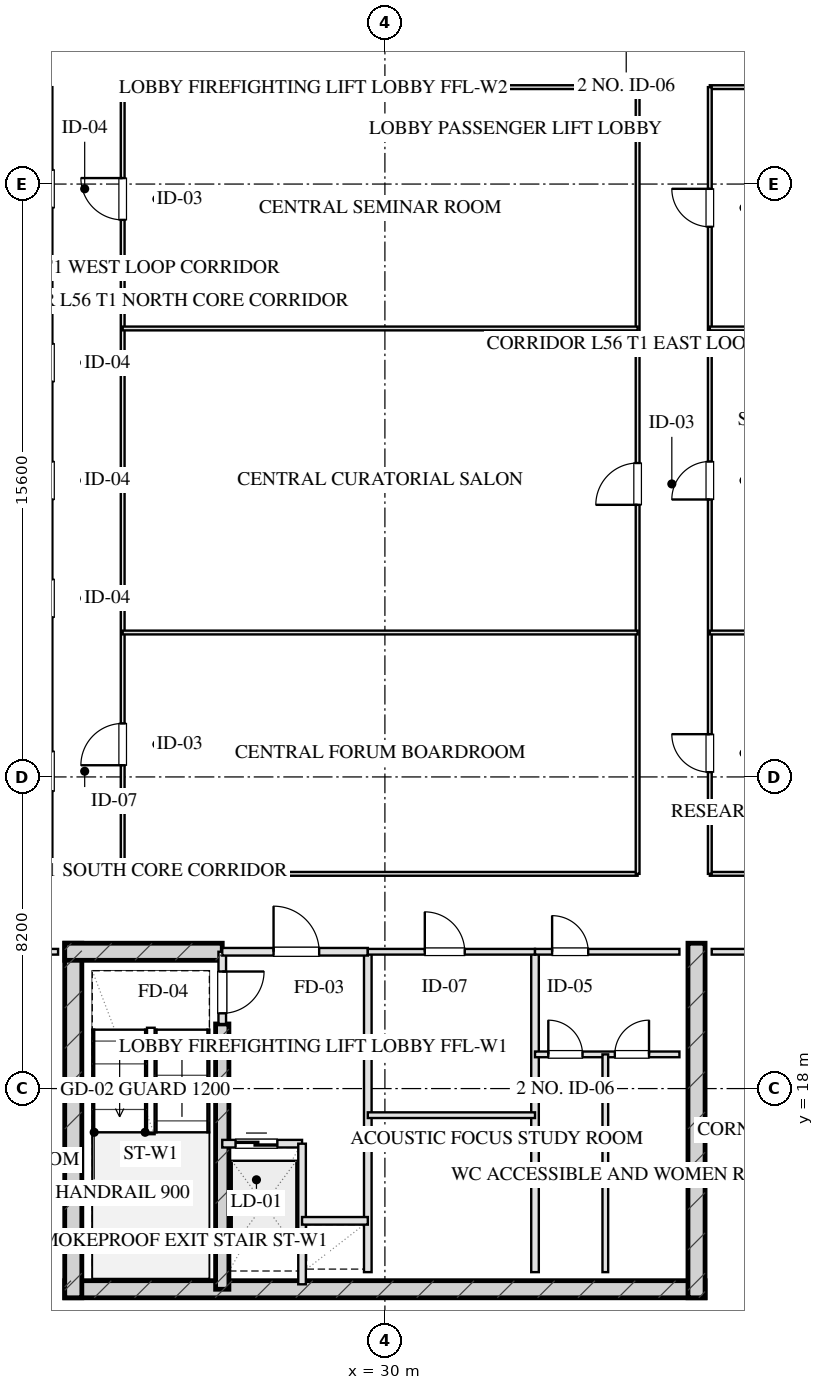
"""IFC4 building model, lengths in metres.
Left out: names, types, materials, properties, quantities, classifications, styles, units other than length and angle.
Written with IfcOpenShell. Run it as: python <this file> out.ifc"""

import sys

from ifc_helpers import new_model, si_unit, direction, frame, frame_2d, origin, place, context, subcontext, project, spatial, rectangle, extrude, element, fill, save


model = new_model("IFC4")
c1 = context("Model", 3, precision=1e-05, world=origin(), true_north=direction((0.0, 1.0)))
c2 = subcontext(c1, "Body", "Model", "MODEL_VIEW")
j1 = project(units=[si_unit("LENGTHUNIT", "METRE"), si_unit("PLANEANGLEUNIT", "RADIAN")], contexts=[c1])
p1 = place(None, origin())
s1 = spatial("IfcSite", under=j1, at=p1, CompositionType="ELEMENT")
p2 = place(p1, origin())
s2 = spatial("IfcBuilding", under=s1, at=p2, CompositionType="ELEMENT")
p3 = place(p2, frame((0.0, 0.0, 209.3)))
s3 = spatial("IfcBuildingStorey", under=s2, at=p3, CompositionType="ELEMENT", Elevation=209.3)
p4 = place(p3, frame((21.575, 12.72, 0.0), z_axis=(0.0, 0.0, 1.0), x_axis=(1.0, 0.0, 0.0)))
e1 = element("IfcWall", 1, at=p4, inside=s3, PredefinedType="SHEAR", context=c2, shape_type="SweptSolid", body=[
    extrude(rectangle(XDim=16.85, YDim=0.45, at=frame_2d((8.425, 0.0))), origin(), (0.0, 0.0, 1.0), 3.45),
])
for number, where, z_axis, x_axis in (
    (2, (21.8, 21.825, 0.0), (0.0, 0.0, 1.0), (0.0, -1.0, 0.0)),
    (3, (38.2, 21.825, 0.0), (0.0, 0.0, 1.0), (0.0, -1.0, 0.0)),
):
    element("IfcWall", number, at=place(p3, frame(where, z_axis=z_axis, x_axis=x_axis)), inside=s3, PredefinedType="SHEAR", context=c2, shape_type="SweptSolid", body=[
        extrude(rectangle(XDim=9.33, YDim=0.45, at=frame_2d((4.665, 0.0))), origin(), (0.0, 0.0, 1.0), 3.45),
    ])
p5 = place(p3, frame((25.72, 19.7, 0.0), z_axis=(0.0, 0.0, 1.0), x_axis=(0.0, -1.0, 0.0)))
e4 = element("IfcWall", 4, at=p5, inside=s3, PredefinedType="SHEAR", context=c2, shape_type="SweptSolid", body=[
    extrude(rectangle(XDim=6.98, YDim=0.35, at=frame_2d((3.49, 0.0))), origin(), (0.0, 0.0, 1.0), 3.45),
])
p6 = place(p3, frame((21.575, 21.6, 0.0), z_axis=(0.0, 0.0, 1.0), x_axis=(1.0, 0.0, 0.0)))
e5 = element("IfcWall", 5, at=p6, inside=s3, PredefinedType="SHEAR", context=c2, shape_type="SweptSolid", body=[
    extrude(rectangle(XDim=4.145, YDim=0.45, at=frame_2d((2.073, 0.0))), origin(), (0.0, 0.0, 1.0), 3.45),
])
p7 = place(p3, frame((25.72, 21.6, 0.0), z_axis=(0.0, 0.0, 1.0), x_axis=(0.0, -1.0, 0.0)))
e6 = element("IfcWall", 6, at=p7, inside=s3, PredefinedType="PARTITIONING", context=c2, shape_type="SweptSolid", body=[
    extrude(rectangle(XDim=1.9, YDim=0.2, at=frame_2d((0.95, 0.0))), origin(), (0.0, 0.0, 1.0), 3.175),
])
p8 = place(p7, frame((0.52, 0.0, 0.0)))
e7 = element("IfcOpeningElement", 7, at=p8, cuts=e6, PredefinedType="OPENING", context=c2, shape_type="SweptSolid", body=[
    extrude(rectangle(XDim=1.1, YDim=2.05, at=frame_2d((0.55, 1.025))), frame((0.0, 0.11, 0.0), z_axis=(0.0, -1.0, 0.0), x_axis=(1.0, 0.0, 0.0)), (0.0, 0.0, 1.0), 0.22),
])
p9 = place(p3, frame((29.55, 21.6, 0.0), z_axis=(0.0, 0.0, 1.0), x_axis=(0.0, -1.0, 0.0)))
e8 = element("IfcWall", 8, at=p9, inside=s3, PredefinedType="PARTITIONING", context=c2, shape_type="SweptSolid", body=[
    extrude(rectangle(XDim=8.43, YDim=0.2, at=frame_2d((4.215, 0.0))), origin(), (0.0, 0.0, 1.0), 3.175),
])
p10 = place(p3, frame((25.72, 21.6, 0.0), z_axis=(0.0, 0.0, 1.0), x_axis=(1.0, 0.0, 0.0)))
e9 = element("IfcWall", 9, at=p10, inside=s3, PredefinedType="PARTITIONING", context=c2, shape_type="SweptSolid", body=[
    extrude(rectangle(XDim=3.83, YDim=0.2, at=frame_2d((1.915, 0.0))), origin(), (0.0, 0.0, 1.0), 3.175),
])
p11 = place(p10, frame((1.35, 0.0, 0.0)))
e10 = element("IfcOpeningElement", 10, at=p11, cuts=e9, PredefinedType="OPENING", context=c2, shape_type="SweptSolid", body=[
    extrude(rectangle(XDim=1.2, YDim=2.05, at=frame_2d((0.6, 1.025))), frame((0.0, 0.11, 0.0), z_axis=(0.0, -1.0, 0.0), x_axis=(1.0, 0.0, 0.0)), (0.0, 0.0, 1.0), 0.22),
])
p12 = place(p3, frame((25.72, 16.55, 0.0), z_axis=(0.0, 0.0, 1.0), x_axis=(1.0, 0.0, 0.0)))
e11 = element("IfcWall", 11, at=p12, inside=s3, PredefinedType="PARTITIONING", context=c2, shape_type="SweptSolid", body=[
    extrude(rectangle(XDim=2.1, YDim=0.2, at=frame_2d((1.05, 0.0))), origin(), (0.0, 0.0, 1.0), 3.175),
])
p13 = place(p12, frame((0.35, 0.0, 0.0)))
e12 = element("IfcOpeningElement", 12, at=p13, cuts=e11, PredefinedType="OPENING", context=c2, shape_type="SweptSolid", body=[
    extrude(rectangle(XDim=1.1, YDim=2.05, at=frame_2d((0.55, 1.025))), frame((0.0, 0.11, 0.0), z_axis=(0.0, -1.0, 0.0), x_axis=(1.0, 0.0, 0.0)), (0.0, 0.0, 1.0), 0.22),
])
p14 = place(p3, frame((27.82, 16.55, 0.0), z_axis=(0.0, 0.0, 1.0), x_axis=(0.0, -1.0, 0.0)))
e13 = element("IfcWall", 13, at=p14, inside=s3, PredefinedType="PARTITIONING", context=c2, shape_type="SweptSolid", body=[
    extrude(rectangle(XDim=3.7, YDim=0.2, at=frame_2d((1.85, 0.0))), origin(), (0.0, 0.0, 1.0), 3.175),
])
p15 = place(p3, frame((27.82, 14.52, 0.0), z_axis=(0.0, 0.0, 1.0), x_axis=(1.0, 0.0, 0.0)))
e14 = element("IfcWall", 14, at=p15, inside=s3, PredefinedType="PARTITIONING", context=c2, shape_type="SweptSolid", body=[
    extrude(rectangle(XDim=1.73, YDim=0.2, at=frame_2d((0.865, 0.0))), origin(), (0.0, 0.0, 1.0), 3.175),
])
p16 = place(p3, frame((33.95, 21.6, 0.0), z_axis=(0.0, 0.0, 1.0), x_axis=(0.0, -1.0, 0.0)))
e15 = element("IfcWall", 15, at=p16, inside=s3, PredefinedType="PARTITIONING", context=c2, shape_type="SweptSolid", body=[
    extrude(rectangle(XDim=8.43, YDim=0.2, at=frame_2d((4.215, 0.0))), origin(), (0.0, 0.0, 1.0), 3.175),
])
p17 = place(p3, frame((29.55, 21.6, 0.0), z_axis=(0.0, 0.0, 1.0), x_axis=(1.0, 0.0, 0.0)))
e16 = element("IfcWall", 16, at=p17, inside=s3, PredefinedType="PARTITIONING", context=c2, shape_type="SweptSolid", body=[
    extrude(rectangle(XDim=4.4, YDim=0.15, at=frame_2d((2.2, 0.0))), origin(), (0.0, 0.0, 1.0), 3.175),
])
p18 = place(p17, frame((1.5, 0.0, 0.0)))
e17 = element("IfcOpeningElement", 17, at=p18, cuts=e16, PredefinedType="OPENING", context=c2, shape_type="SweptSolid", body=[
    extrude(rectangle(XDim=1.05, YDim=2.05, at=frame_2d((0.525, 1.025))), frame((0.0, 0.085, 0.0), z_axis=(0.0, -1.0, 0.0), x_axis=(1.0, 0.0, 0.0)), (0.0, 0.0, 1.0), 0.17),
])
p19 = place(p3, frame((29.55, 17.3, 0.0), z_axis=(0.0, 0.0, 1.0), x_axis=(1.0, 0.0, 0.0)))
e18 = element("IfcWall", 18, at=p19, inside=s3, PredefinedType="PARTITIONING", context=c2, shape_type="SweptSolid", body=[
    extrude(rectangle(XDim=4.4, YDim=0.15, at=frame_2d((2.2, 0.0))), origin(), (0.0, 0.0, 1.0), 3.175),
])
p20 = place(p3, frame((33.95, 21.6, 0.0), z_axis=(0.0, 0.0, 1.0), x_axis=(1.0, 0.0, 0.0)))
e19 = element("IfcWall", 19, at=p20, inside=s3, PredefinedType="PARTITIONING", context=c2, shape_type="SweptSolid", body=[
    extrude(rectangle(XDim=3.8, YDim=0.15, at=frame_2d((1.9, 0.0))), origin(), (0.0, 0.0, 1.0), 3.175),
])
p21 = place(p20, frame((0.45, 0.0, 0.0)))
e20 = element("IfcOpeningElement", 20, at=p21, cuts=e19, PredefinedType="OPENING", context=c2, shape_type="SweptSolid", body=[
    extrude(rectangle(XDim=0.95, YDim=2.05, at=frame_2d((0.475, 1.025))), frame((0.0, 0.085, 0.0), z_axis=(0.0, -1.0, 0.0), x_axis=(1.0, 0.0, 0.0)), (0.0, 0.0, 1.0), 0.17),
])
p22 = place(p3, frame((33.95, 18.9, 0.0), z_axis=(0.0, 0.0, 1.0), x_axis=(1.0, 0.0, 0.0)))
e21 = element("IfcWall", 21, at=p22, inside=s3, PredefinedType="PARTITIONING", context=c2, shape_type="SweptSolid", body=[
    extrude(rectangle(XDim=3.8, YDim=0.15, at=frame_2d((1.9, 0.0))), origin(), (0.0, 0.0, 1.0), 3.175),
])
p23 = place(p22, frame((0.35, 0.0, 0.0)))
e22 = element("IfcOpeningElement", 22, at=p23, cuts=e21, PredefinedType="OPENING", context=c2, shape_type="SweptSolid", body=[
    extrude(rectangle(XDim=0.9, YDim=2.05, at=frame_2d((0.45, 1.025))), frame((0.0, 0.085, 0.0), z_axis=(0.0, -1.0, 0.0), x_axis=(1.0, 0.0, 0.0)), (0.0, 0.0, 1.0), 0.17),
])
p24 = place(p22, frame((2.1, 0.0, 0.0)))
e23 = element("IfcOpeningElement", 23, at=p24, cuts=e21, PredefinedType="OPENING", context=c2, shape_type="SweptSolid", body=[
    extrude(rectangle(XDim=0.9, YDim=2.05, at=frame_2d((0.45, 1.025))), frame((0.0, 0.085, 0.0), z_axis=(0.0, -1.0, 0.0), x_axis=(1.0, 0.0, 0.0)), (0.0, 0.0, 1.0), 0.17),
])
p25 = place(p3, frame((35.8, 18.9, 0.0), z_axis=(0.0, 0.0, 1.0), x_axis=(0.0, -1.0, 0.0)))
e24 = element("IfcWall", 24, at=p25, inside=s3, PredefinedType="PARTITIONING", context=c2, shape_type="SweptSolid", body=[
    extrude(rectangle(XDim=5.73, YDim=0.15, at=frame_2d((2.865, 0.0))), origin(), (0.0, 0.0, 1.0), 3.175),
])
p26 = place(p3, frame((13.2, 21.6, 0.0), z_axis=(0.0, 0.0, 1.0), x_axis=(1.0, 0.0, 0.0)))
e25 = element("IfcWall", 25, at=p26, inside=s3, PredefinedType="PARTITIONING", context=c2, shape_type="SweptSolid", body=[
    extrude(rectangle(XDim=8.2, YDim=0.15, at=frame_2d((4.1, 0.0))), origin(), (0.0, 0.0, 1.0), 3.175),
])
p27 = place(p26, frame((3.444, 0.0, 0.0)))
e26 = element("IfcOpeningElement", 26, at=p27, cuts=e25, PredefinedType="OPENING", context=c2, shape_type="SweptSolid", body=[
    extrude(rectangle(XDim=0.85, YDim=2.05, at=frame_2d((0.425, 1.025))), frame((0.0, 0.085, 0.0), z_axis=(0.0, -1.0, 0.0), x_axis=(1.0, 0.0, 0.0)), (0.0, 0.0, 1.0), 0.17),
])
p28 = place(p3, frame((38.6, 21.6, 0.0), z_axis=(0.0, 0.0, 1.0), x_axis=(1.0, 0.0, 0.0)))
e27 = element("IfcWall", 27, at=p28, inside=s3, PredefinedType="PARTITIONING", context=c2, shape_type="SweptSolid", body=[
    extrude(rectangle(XDim=8.2, YDim=0.15, at=frame_2d((4.1, 0.0))), origin(), (0.0, 0.0, 1.0), 3.175),
])
p29 = place(p28, frame((3.444, 0.0, 0.0)))
e28 = element("IfcOpeningElement", 28, at=p29, cuts=e27, PredefinedType="OPENING", context=c2, shape_type="SweptSolid", body=[
    extrude(rectangle(XDim=1.0, YDim=2.05, at=frame_2d((0.5, 1.025))), frame((0.0, 0.085, 0.0), z_axis=(0.0, -1.0, 0.0), x_axis=(1.0, 0.0, 0.0)), (0.0, 0.0, 1.0), 0.17),
])
p30 = place(p3, frame((23.1, 23.65, 0.0), z_axis=(0.0, 0.0, 1.0), x_axis=(1.0, 0.0, 0.0)))
e29 = element("IfcWall", 29, at=p30, inside=s3, PredefinedType="MOVABLE", context=c2, shape_type="SweptSolid", body=[
    extrude(rectangle(XDim=13.55, YDim=0.1, at=frame_2d((6.775, 0.0))), origin(), (0.0, 0.0, 1.0), 3.175),
])
p31 = place(p3, frame((38.55, 23.65, 0.0), z_axis=(0.0, 0.0, 1.0), x_axis=(1.0, 0.0, 0.0)))
e30 = element("IfcWall", 30, at=p31, inside=s3, PredefinedType="MOVABLE", context=c2, shape_type="SweptSolid", body=[
    extrude(rectangle(XDim=8.25, YDim=0.1, at=frame_2d((4.125, 0.0))), origin(), (0.0, 0.0, 1.0), 3.175),
])
p32 = place(p3, frame((23.1, 44.35, 0.0), z_axis=(0.0, 0.0, 1.0), x_axis=(1.0, 0.0, 0.0)))
e31 = element("IfcWall", 31, at=p32, inside=s3, PredefinedType="MOVABLE", context=c2, shape_type="SweptSolid", body=[
    extrude(rectangle(XDim=13.55, YDim=0.1, at=frame_2d((6.775, 0.0))), origin(), (0.0, 0.0, 1.0), 3.175),
])
p33 = place(p3, frame((38.55, 44.35, 0.0), z_axis=(0.0, 0.0, 1.0), x_axis=(1.0, 0.0, 0.0)))
e32 = element("IfcWall", 32, at=p33, inside=s3, PredefinedType="MOVABLE", context=c2, shape_type="SweptSolid", body=[
    extrude(rectangle(XDim=8.25, YDim=0.1, at=frame_2d((4.125, 0.0))), origin(), (0.0, 0.0, 1.0), 3.175),
])
p34 = place(p3, frame((23.1, 23.65, 0.0), z_axis=(0.0, 0.0, 1.0), x_axis=(0.0, 1.0, 0.0)))
e33 = element("IfcWall", 33, at=p34, inside=s3, PredefinedType="MOVABLE", context=c2, shape_type="SweptSolid", body=[
    extrude(rectangle(XDim=20.7, YDim=0.1, at=frame_2d((10.35, 0.0))), origin(), (0.0, 0.0, 1.0), 3.175),
])
p35 = place(p34, frame((2.857, 0.0, 0.0)))
e34 = element("IfcOpeningElement", 34, at=p35, cuts=e33, PredefinedType="OPENING", context=c2, shape_type="SweptSolid", body=[
    extrude(rectangle(XDim=1.1, YDim=2.05, at=frame_2d((0.55, 1.025))), frame((0.0, 0.06, 0.0), z_axis=(0.0, -1.0, 0.0), x_axis=(1.0, 0.0, 0.0)), (0.0, 0.0, 1.0), 0.12),
])
p36 = place(p34, frame((17.208, 0.0, 0.0)))
e35 = element("IfcOpeningElement", 35, at=p36, cuts=e33, PredefinedType="OPENING", context=c2, shape_type="SweptSolid", body=[
    extrude(rectangle(XDim=1.1, YDim=2.05, at=frame_2d((0.55, 1.025))), frame((0.0, 0.06, 0.0), z_axis=(0.0, -1.0, 0.0), x_axis=(1.0, 0.0, 0.0)), (0.0, 0.0, 1.0), 0.12),
])
p37 = place(p3, frame((36.65, 23.65, 0.0), z_axis=(0.0, 0.0, 1.0), x_axis=(0.0, 1.0, 0.0)))
e36 = element("IfcWall", 36, at=p37, inside=s3, PredefinedType="MOVABLE", context=c2, shape_type="SweptSolid", body=[
    extrude(rectangle(XDim=20.7, YDim=0.1, at=frame_2d((10.35, 0.0))), origin(), (0.0, 0.0, 1.0), 3.175),
])
p38 = place(p37, frame((9.71, 0.0, 0.0)))
e37 = element("IfcOpeningElement", 37, at=p38, cuts=e36, PredefinedType="OPENING", context=c2, shape_type="SweptSolid", body=[
    extrude(rectangle(XDim=1.1, YDim=2.05, at=frame_2d((0.55, 1.025))), frame((0.0, 0.06, 0.0), z_axis=(0.0, -1.0, 0.0), x_axis=(1.0, 0.0, 0.0)), (0.0, 0.0, 1.0), 0.12),
])
p39 = place(p3, frame((38.55, 23.65, 0.0), z_axis=(0.0, 0.0, 1.0), x_axis=(0.0, 1.0, 0.0)))
e38 = element("IfcWall", 38, at=p39, inside=s3, PredefinedType="MOVABLE", context=c2, shape_type="SweptSolid", body=[
    extrude(rectangle(XDim=20.7, YDim=0.1, at=frame_2d((10.35, 0.0))), origin(), (0.0, 0.0, 1.0), 3.175),
])
p40 = place(p39, frame((2.675, 0.0, 0.0)))
e39 = element("IfcOpeningElement", 39, at=p40, cuts=e38, PredefinedType="OPENING", context=c2, shape_type="SweptSolid", body=[
    extrude(rectangle(XDim=1.0, YDim=2.05, at=frame_2d((0.5, 1.025))), frame((0.0, 0.06, 0.0), z_axis=(0.0, -1.0, 0.0), x_axis=(1.0, 0.0, 0.0)), (0.0, 0.0, 1.0), 0.12),
])
p41 = place(p39, frame((9.85, 0.0, 0.0)))
e40 = element("IfcOpeningElement", 40, at=p41, cuts=e38, PredefinedType="OPENING", context=c2, shape_type="SweptSolid", body=[
    extrude(rectangle(XDim=1.0, YDim=2.05, at=frame_2d((0.5, 1.025))), frame((0.0, 0.06, 0.0), z_axis=(0.0, -1.0, 0.0), x_axis=(1.0, 0.0, 0.0)), (0.0, 0.0, 1.0), 0.12),
])
p42 = place(p39, frame((17.025, 0.0, 0.0)))
e41 = element("IfcOpeningElement", 41, at=p42, cuts=e38, PredefinedType="OPENING", context=c2, shape_type="SweptSolid", body=[
    extrude(rectangle(XDim=1.0, YDim=2.05, at=frame_2d((0.5, 1.025))), frame((0.0, 0.06, 0.0), z_axis=(0.0, -1.0, 0.0), x_axis=(1.0, 0.0, 0.0)), (0.0, 0.0, 1.0), 0.12),
])
for number, where, z_axis, x_axis in (
    (42, (23.1, 30.0, 0.0), (0.0, 0.0, 1.0), (1.0, 0.0, 0.0)),
    (43, (23.1, 38.0, 0.0), (0.0, 0.0, 1.0), (1.0, 0.0, 0.0)),
):
    element("IfcWall", number, at=place(p3, frame(where, z_axis=z_axis, x_axis=x_axis)), inside=s3, PredefinedType="MOVABLE", context=c2, shape_type="SweptSolid", body=[
        extrude(rectangle(XDim=13.55, YDim=0.1, at=frame_2d((6.775, 0.0))), origin(), (0.0, 0.0, 1.0), 3.175),
    ])
for number, where, z_axis, x_axis in (
    (44, (38.55, 30.0, 0.0), (0.0, 0.0, 1.0), (1.0, 0.0, 0.0)),
    (45, (38.55, 38.0, 0.0), (0.0, 0.0, 1.0), (1.0, 0.0, 0.0)),
):
    element("IfcWall", number, at=place(p3, frame(where, z_axis=z_axis, x_axis=x_axis)), inside=s3, PredefinedType="MOVABLE", context=c2, shape_type="SweptSolid", body=[
        extrude(rectangle(XDim=8.25, YDim=0.1, at=frame_2d((4.125, 0.0))), origin(), (0.0, 0.0, 1.0), 3.175),
    ])
p43 = place(p8, origin())
e46 = element("IfcDoor", 46, at=p43, inside=s3, OperationType="SINGLE_SWING_LEFT", PredefinedType="DOOR", context=c2, shape_type="SweptSolid", body=[
    extrude(rectangle(XDim=1.1, YDim=2.05, at=frame_2d((0.55, 1.025))), frame((0.0, 0.025, 0.0), z_axis=(0.0, -1.0, 0.0), x_axis=(1.0, 0.0, 0.0)), (0.0, 0.0, 1.0), 0.05),
])
fill(e7, e46)
p44 = place(p11, origin())
e47 = element("IfcDoor", 47, at=p44, inside=s3, OperationType="SINGLE_SWING_LEFT", PredefinedType="DOOR", context=c2, shape_type="SweptSolid", body=[
    extrude(rectangle(XDim=1.2, YDim=2.05, at=frame_2d((0.6, 1.025))), frame((0.0, 0.025, 0.0), z_axis=(0.0, -1.0, 0.0), x_axis=(1.0, 0.0, 0.0)), (0.0, 0.0, 1.0), 0.05),
])
fill(e10, e47)
p45 = place(p13, origin())
e48 = element("IfcDoor", 48, at=p45, inside=s3, OperationType="DOUBLE_DOOR_SLIDING", PredefinedType="DOOR", context=c2, shape_type="SweptSolid", body=[
    extrude(rectangle(XDim=1.1, YDim=2.05, at=frame_2d((0.55, 1.025))), frame((0.0, 0.025, 0.0), z_axis=(0.0, -1.0, 0.0), x_axis=(1.0, 0.0, 0.0)), (0.0, 0.0, 1.0), 0.05),
])
fill(e12, e48)
p46 = place(p18, origin())
e49 = element("IfcDoor", 49, at=p46, inside=s3, OperationType="SINGLE_SWING_LEFT", PredefinedType="DOOR", context=c2, shape_type="SweptSolid", body=[
    extrude(rectangle(XDim=1.05, YDim=2.05, at=frame_2d((0.525, 1.025))), frame((0.0, 0.025, 0.0), z_axis=(0.0, -1.0, 0.0), x_axis=(1.0, 0.0, 0.0)), (0.0, 0.0, 1.0), 0.05),
])
fill(e17, e49)
p47 = place(p21, origin())
e50 = element("IfcDoor", 50, at=p47, inside=s3, OperationType="SINGLE_SWING_LEFT", PredefinedType="DOOR", context=c2, shape_type="SweptSolid", body=[
    extrude(rectangle(XDim=0.95, YDim=2.05, at=frame_2d((0.475, 1.025))), frame((0.0, 0.025, 0.0), z_axis=(0.0, -1.0, 0.0), x_axis=(1.0, 0.0, 0.0)), (0.0, 0.0, 1.0), 0.05),
])
fill(e20, e50)
p48 = place(p23, origin())
e51 = element("IfcDoor", 51, at=p48, inside=s3, OperationType="SINGLE_SWING_LEFT", PredefinedType="DOOR", context=c2, shape_type="SweptSolid", body=[
    extrude(rectangle(XDim=0.9, YDim=2.05, at=frame_2d((0.45, 1.025))), frame((0.0, 0.025, 0.0), z_axis=(0.0, -1.0, 0.0), x_axis=(1.0, 0.0, 0.0)), (0.0, 0.0, 1.0), 0.05),
])
fill(e22, e51)
p49 = place(p24, origin())
e52 = element("IfcDoor", 52, at=p49, inside=s3, OperationType="SINGLE_SWING_RIGHT", PredefinedType="DOOR", context=c2, shape_type="SweptSolid", body=[
    extrude(rectangle(XDim=0.9, YDim=2.05, at=frame_2d((0.45, 1.025))), frame((0.0, 0.025, 0.0), z_axis=(0.0, -1.0, 0.0), x_axis=(1.0, 0.0, 0.0)), (0.0, 0.0, 1.0), 0.05),
])
fill(e23, e52)
p50 = place(p35, origin())
e53 = element("IfcDoor", 53, at=p50, inside=s3, OperationType="SINGLE_SWING_LEFT", PredefinedType="DOOR", context=c2, shape_type="SweptSolid", body=[
    extrude(rectangle(XDim=1.1, YDim=2.05, at=frame_2d((0.55, 1.025))), frame((0.0, 0.025, 0.0), z_axis=(0.0, -1.0, 0.0), x_axis=(1.0, 0.0, 0.0)), (0.0, 0.0, 1.0), 0.05),
])
fill(e34, e53)
p51 = place(p36, origin())
e54 = element("IfcDoor", 54, at=p51, inside=s3, OperationType="SINGLE_SWING_RIGHT", PredefinedType="DOOR", context=c2, shape_type="SweptSolid", body=[
    extrude(rectangle(XDim=1.1, YDim=2.05, at=frame_2d((0.55, 1.025))), frame((0.0, 0.025, 0.0), z_axis=(0.0, -1.0, 0.0), x_axis=(1.0, 0.0, 0.0)), (0.0, 0.0, 1.0), 0.05),
])
fill(e35, e54)
p52 = place(p38, origin())
e55 = element("IfcDoor", 55, at=p52, inside=s3, OperationType="SINGLE_SWING_LEFT", PredefinedType="DOOR", context=c2, shape_type="SweptSolid", body=[
    extrude(rectangle(XDim=1.1, YDim=2.05, at=frame_2d((0.55, 1.025))), frame((0.0, 0.025, 0.0), z_axis=(0.0, -1.0, 0.0), x_axis=(1.0, 0.0, 0.0)), (0.0, 0.0, 1.0), 0.05),
])
fill(e37, e55)
p53 = place(p40, origin())
e56 = element("IfcDoor", 56, at=p53, inside=s3, OperationType="SINGLE_SWING_RIGHT", PredefinedType="DOOR", context=c2, shape_type="SweptSolid", body=[
    extrude(rectangle(XDim=1.0, YDim=2.05, at=frame_2d((0.5, 1.025))), frame((0.0, 0.025, 0.0), z_axis=(0.0, -1.0, 0.0), x_axis=(1.0, 0.0, 0.0)), (0.0, 0.0, 1.0), 0.05),
])
fill(e39, e56)
p54 = place(p41, origin())
e57 = element("IfcDoor", 57, at=p54, inside=s3, OperationType="SINGLE_SWING_LEFT", PredefinedType="DOOR", context=c2, shape_type="SweptSolid", body=[
    extrude(rectangle(XDim=1.0, YDim=2.05, at=frame_2d((0.5, 1.025))), frame((0.0, 0.025, 0.0), z_axis=(0.0, -1.0, 0.0), x_axis=(1.0, 0.0, 0.0)), (0.0, 0.0, 1.0), 0.05),
])
fill(e40, e57)
p55 = place(p42, origin())
e58 = element("IfcDoor", 58, at=p55, inside=s3, OperationType="SINGLE_SWING_RIGHT", PredefinedType="DOOR", context=c2, shape_type="SweptSolid", body=[
    extrude(rectangle(XDim=1.0, YDim=2.05, at=frame_2d((0.5, 1.025))), frame((0.0, 0.025, 0.0), z_axis=(0.0, -1.0, 0.0), x_axis=(1.0, 0.0, 0.0)), (0.0, 0.0, 1.0), 0.05),
])
fill(e41, e58)
save(model, sys.argv[1])
